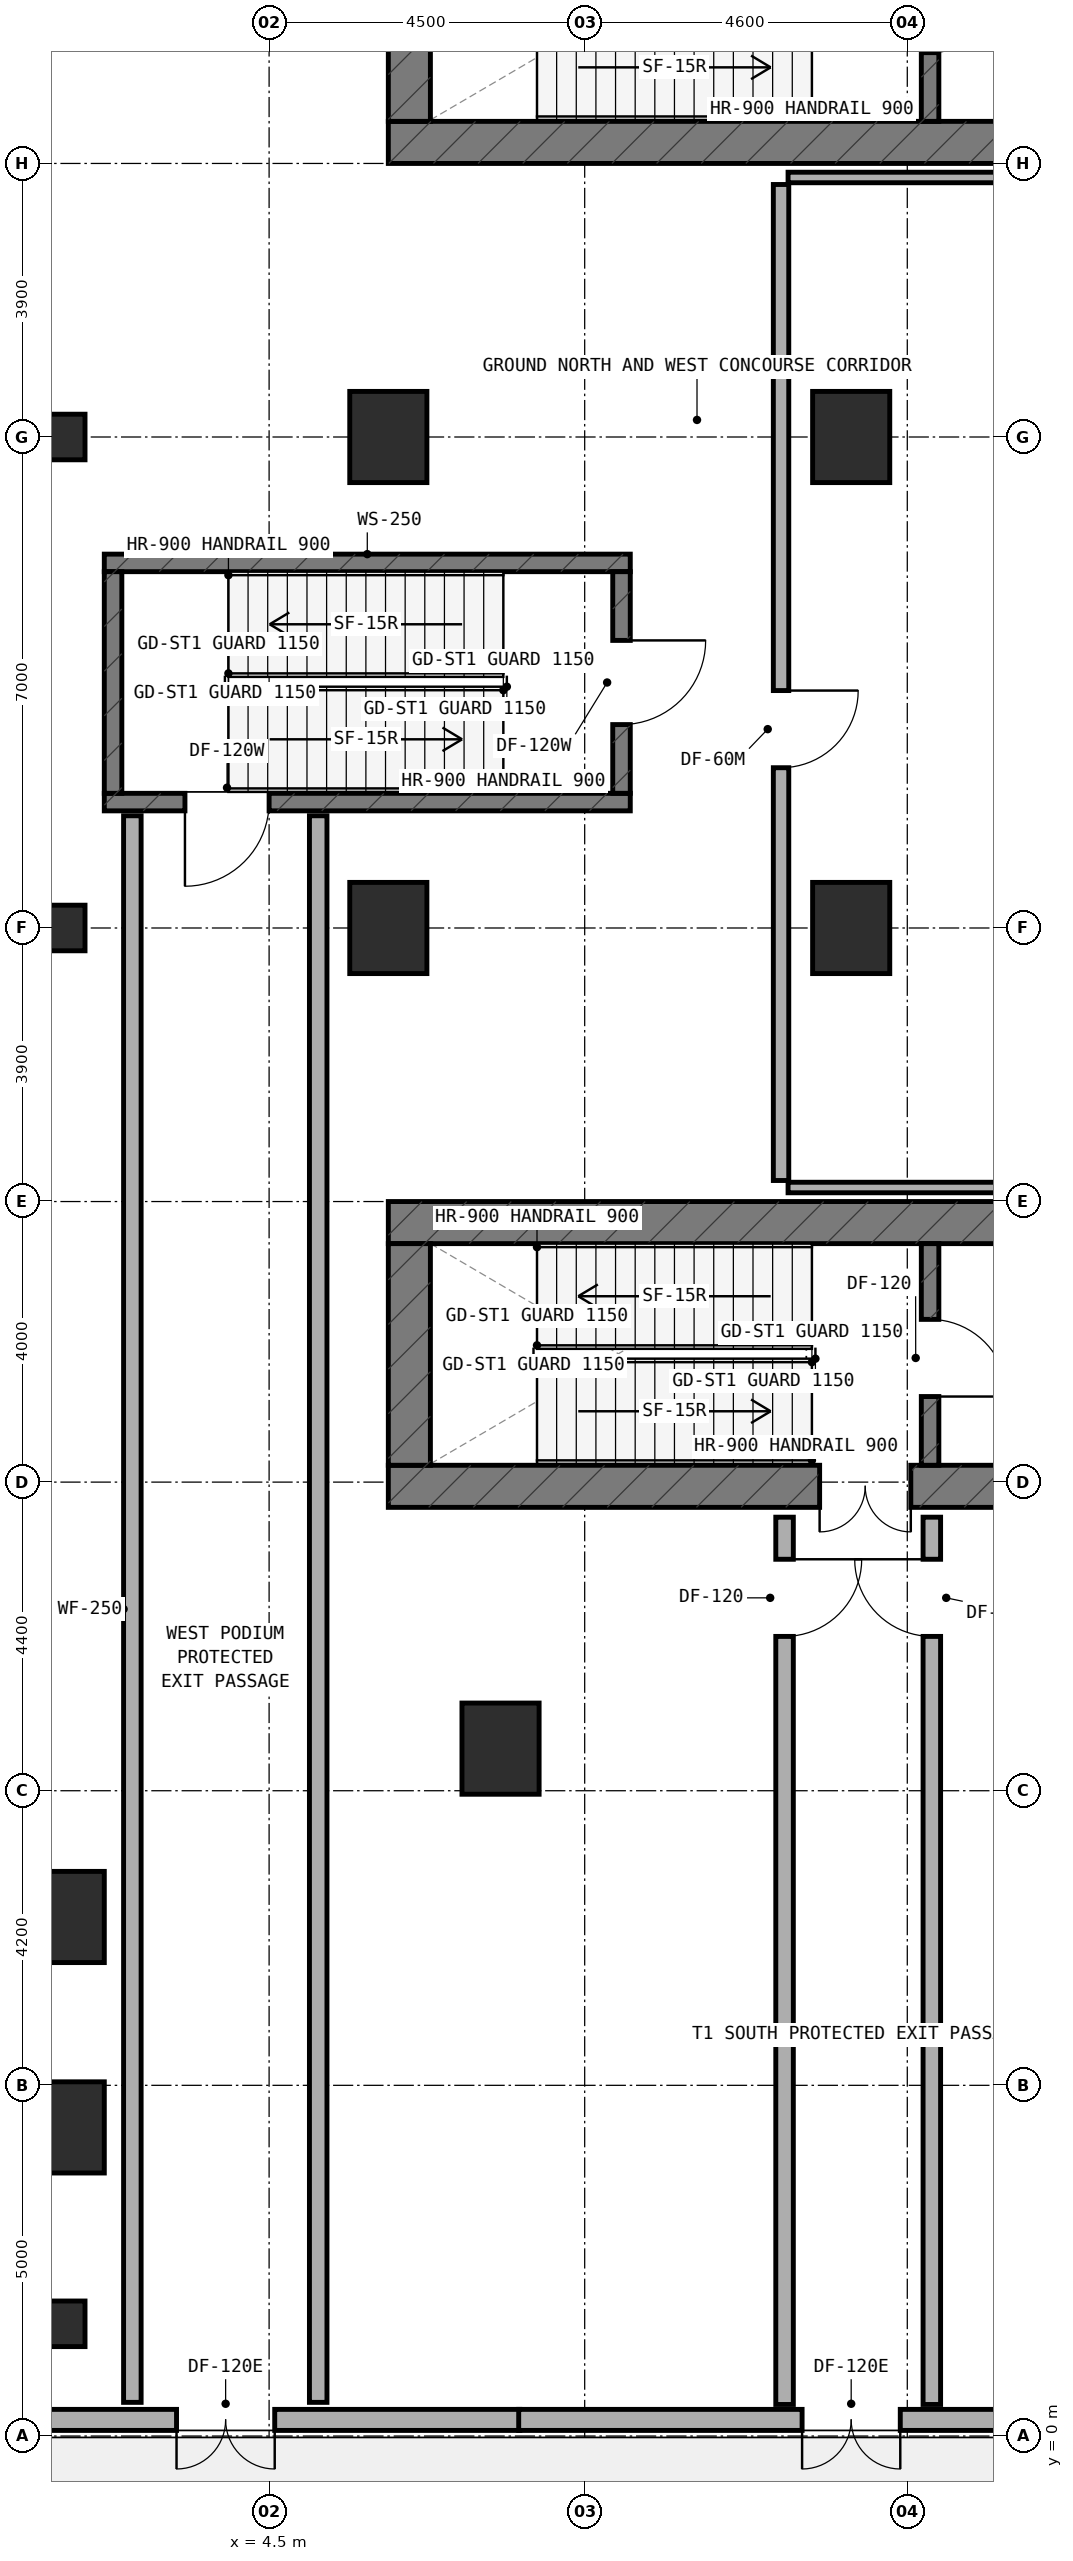
"""IFC4 building model, lengths in metres.
Left out: names, types, materials, properties, quantities, classifications, styles, units other than length and angle.
Written with IfcOpenShell. Run it as: python <this file> out.ifc"""

import sys

from ifc_helpers import new_model, si_unit, direction, frame, frame_2d, origin, origin_2d, place, context, subcontext, project, spatial, rectangle, extrude, element, fill, save


model = new_model("IFC4")
c1 = context("Model", 3, precision=1e-05, world=origin(), true_north=direction((0.0, 1.0)))
c2 = subcontext(c1, "Body", "Model", "MODEL_VIEW")
j1 = project(units=[si_unit("LENGTHUNIT", "METRE"), si_unit("PLANEANGLEUNIT", "RADIAN")], contexts=[c1])
p1 = place(None, origin())
s1 = spatial("IfcSite", under=j1, at=p1, CompositionType="ELEMENT")
p2 = place(p1, origin())
s2 = spatial("IfcBuilding", under=s1, at=p2, CompositionType="ELEMENT")
p3 = place(p2, origin())
s3 = spatial("IfcBuildingStorey", under=s2, at=p3, CompositionType="ELEMENT", Elevation=0.0)
p4 = place(p3, frame((6.2, 32.7, 0.0), z_axis=(0.0, 0.0, 1.0), x_axis=(1.0, 0.0, 0.0)))
e1 = element("IfcWall", 1, at=p4, inside=s3, PredefinedType="SHEAR", context=c2, shape_type="SweptSolid", body=[
    extrude(rectangle(XDim=24.8, YDim=0.6, at=frame_2d((12.4, 0.0))), origin(), (0.0, 0.0, 1.0), 5.4),
])
p5 = place(p3, frame((6.5, 33.0, 0.0), z_axis=(0.0, 0.0, 1.0), x_axis=(0.0, 1.0, 0.0)))
e2 = element("IfcWall", 2, at=p5, inside=s3, PredefinedType="SHEAR", context=c2, shape_type="SweptSolid", body=[
    extrude(rectangle(XDim=3.16, YDim=0.6, at=frame_2d((1.58, 0.0))), origin(), (0.0, 0.0, 1.0), 5.4),
])
p6 = place(p3, frame((13.925, 33.0, 0.0), z_axis=(0.0, 0.0, 1.0), x_axis=(0.0, 1.0, 0.0)))
e3 = element("IfcWall", 3, at=p6, inside=s3, PredefinedType="STANDARD", context=c2, shape_type="SweptSolid", body=[
    extrude(rectangle(XDim=3.16, YDim=0.25, at=frame_2d((1.58, 0.0))), origin(), (0.0, 0.0, 1.0), 5.05),
])
p7 = place(p6, frame((0.98, 0.0, 0.0)))
e4 = element("IfcOpeningElement", 4, at=p7, cuts=e3, PredefinedType="OPENING", context=c2, shape_type="SweptSolid", body=[
    extrude(rectangle(XDim=1.1, YDim=2.15, at=frame_2d((0.55, 1.075))), frame((0.0, 0.135, 0.0), z_axis=(0.0, -1.0, 0.0), x_axis=(1.0, 0.0, 0.0)), (0.0, 0.0, 1.0), 0.27),
])
p8 = place(p3, frame((6.2, 13.54, 0.0), z_axis=(0.0, 0.0, 1.0), x_axis=(1.0, 0.0, 0.0)))
e5 = element("IfcWall", 5, at=p8, inside=s3, PredefinedType="SHEAR", context=c2, shape_type="SweptSolid", body=[
    extrude(rectangle(XDim=24.8, YDim=0.6, at=frame_2d((12.4, 0.0))), origin(), (0.0, 0.0, 1.0), 5.4),
])
p9 = place(p8, frame((9.35, 0.0, 0.0)))
e6 = element("IfcOpeningElement", 6, at=p9, cuts=e5, PredefinedType="OPENING", context=c2, shape_type="SweptSolid", body=[
    extrude(rectangle(XDim=1.2, YDim=2.15, at=frame_2d((0.6, 1.075))), frame((0.0, 0.31, 0.0), z_axis=(0.0, -1.0, 0.0), x_axis=(1.0, 0.0, 0.0)), (0.0, 0.0, 1.0), 0.62),
])
p10 = place(p8, frame((6.15, 0.0, 0.0)))
e7 = element("IfcOpeningElement", 7, at=p10, cuts=e5, PredefinedType="OPENING", context=c2, shape_type="SweptSolid", body=[
    extrude(rectangle(XDim=1.3, YDim=2.15, at=frame_2d((0.65, 1.075))), frame((0.0, 0.31, 0.0), z_axis=(0.0, -1.0, 0.0), x_axis=(1.0, 0.0, 0.0)), (0.0, 0.0, 1.0), 0.62),
])
p11 = place(p8, frame((17.14, 0.0, 0.0)))
e8 = element("IfcOpeningElement", 8, at=p11, cuts=e5, PredefinedType="OPENING", context=c2, shape_type="SweptSolid", body=[
    extrude(rectangle(XDim=0.85, YDim=2.1, at=frame_2d((0.425, 1.05))), frame((0.0, 0.31, 0.0), z_axis=(0.0, -1.0, 0.0), x_axis=(1.0, 0.0, 0.0)), (0.0, 0.0, 1.0), 0.62),
])
p12 = place(p8, frame((18.983, 0.0, 0.0)))
e9 = element("IfcOpeningElement", 9, at=p12, cuts=e5, PredefinedType="OPENING", context=c2, shape_type="SweptSolid", body=[
    extrude(rectangle(XDim=1.1, YDim=2.15, at=frame_2d((0.55, 1.075))), frame((0.0, 0.31, 0.0), z_axis=(0.0, -1.0, 0.0), x_axis=(1.0, 0.0, 0.0)), (0.0, 0.0, 1.0), 0.62),
])
p13 = place(p8, frame((20.85, 0.0, 0.0)))
e10 = element("IfcOpeningElement", 10, at=p13, cuts=e5, PredefinedType="OPENING", context=c2, shape_type="SweptSolid", body=[
    extrude(rectangle(XDim=1.1, YDim=2.15, at=frame_2d((0.55, 1.075))), frame((0.0, 0.31, 0.0), z_axis=(0.0, -1.0, 0.0), x_axis=(1.0, 0.0, 0.0)), (0.0, 0.0, 1.0), 0.62),
])
p14 = place(p8, frame((22.716, 0.0, 0.0)))
e11 = element("IfcOpeningElement", 11, at=p14, cuts=e5, PredefinedType="OPENING", context=c2, shape_type="SweptSolid", body=[
    extrude(rectangle(XDim=1.1, YDim=2.15, at=frame_2d((0.55, 1.075))), frame((0.0, 0.31, 0.0), z_axis=(0.0, -1.0, 0.0), x_axis=(1.0, 0.0, 0.0)), (0.0, 0.0, 1.0), 0.62),
])
p15 = place(p3, frame((6.2, 17.3, 0.0), z_axis=(0.0, 0.0, 1.0), x_axis=(1.0, 0.0, 0.0)))
e12 = element("IfcWall", 12, at=p15, inside=s3, PredefinedType="SHEAR", context=c2, shape_type="SweptSolid", body=[
    extrude(rectangle(XDim=24.8, YDim=0.6, at=frame_2d((12.4, 0.0))), origin(), (0.0, 0.0, 1.0), 5.4),
])
p16 = place(p3, frame((6.5, 13.84, 0.0), z_axis=(0.0, 0.0, 1.0), x_axis=(0.0, 1.0, 0.0)))
e13 = element("IfcWall", 13, at=p16, inside=s3, PredefinedType="SHEAR", context=c2, shape_type="SweptSolid", body=[
    extrude(rectangle(XDim=3.16, YDim=0.6, at=frame_2d((1.58, 0.0))), origin(), (0.0, 0.0, 1.0), 5.4),
])
p17 = place(p3, frame((13.925, 13.84, 0.0), z_axis=(0.0, 0.0, 1.0), x_axis=(0.0, 1.0, 0.0)))
e14 = element("IfcWall", 14, at=p17, inside=s3, PredefinedType="STANDARD", context=c2, shape_type="SweptSolid", body=[
    extrude(rectangle(XDim=3.16, YDim=0.25, at=frame_2d((1.58, 0.0))), origin(), (0.0, 0.0, 1.0), 5.05),
])
p18 = place(p17, frame((0.98, 0.0, 0.0)))
e15 = element("IfcOpeningElement", 15, at=p18, cuts=e14, PredefinedType="OPENING", context=c2, shape_type="SweptSolid", body=[
    extrude(rectangle(XDim=1.1, YDim=2.15, at=frame_2d((0.55, 1.075))), frame((0.0, 0.135, 0.0), z_axis=(0.0, -1.0, 0.0), x_axis=(1.0, 0.0, 0.0)), (0.0, 0.0, 1.0), 0.27),
])
p19 = place(p3, frame((2.15, 23.295, 0.0), z_axis=(0.0, 0.0, 1.0), x_axis=(1.0, 0.0, 0.0)))
e16 = element("IfcWall", 16, at=p19, inside=s3, PredefinedType="STANDARD", context=c2, shape_type="SweptSolid", body=[
    extrude(rectangle(XDim=7.5, YDim=0.25, at=frame_2d((3.75, 0.0))), origin(), (0.0, 0.0, 1.0), 5.4),
])
p20 = place(p19, frame((1.15, 0.0, 0.0)))
e17 = element("IfcOpeningElement", 17, at=p20, cuts=e16, PredefinedType="OPENING", context=c2, shape_type="SweptSolid", body=[
    extrude(rectangle(XDim=1.2, YDim=2.15, at=frame_2d((0.6, 1.075))), frame((0.0, 0.135, 0.0), z_axis=(0.0, -1.0, 0.0), x_axis=(1.0, 0.0, 0.0)), (0.0, 0.0, 1.0), 0.27),
])
p21 = place(p3, frame((2.15, 26.705, 0.0), z_axis=(0.0, 0.0, 1.0), x_axis=(1.0, 0.0, 0.0)))
e18 = element("IfcWall", 18, at=p21, inside=s3, PredefinedType="STANDARD", context=c2, shape_type="SweptSolid", body=[
    extrude(rectangle(XDim=7.5, YDim=0.25, at=frame_2d((3.75, 0.0))), origin(), (0.0, 0.0, 1.0), 5.4),
])
p22 = place(p3, frame((2.275, 23.42, 0.0), z_axis=(0.0, 0.0, 1.0), x_axis=(0.0, 1.0, 0.0)))
e19 = element("IfcWall", 19, at=p22, inside=s3, PredefinedType="STANDARD", context=c2, shape_type="SweptSolid", body=[
    extrude(rectangle(XDim=3.16, YDim=0.25, at=frame_2d((1.58, 0.0))), origin(), (0.0, 0.0, 1.0), 5.4),
])
p23 = place(p3, frame((9.525, 23.42, 0.0), z_axis=(0.0, 0.0, 1.0), x_axis=(0.0, 1.0, 0.0)))
e20 = element("IfcWall", 20, at=p23, inside=s3, PredefinedType="STANDARD", context=c2, shape_type="SweptSolid", body=[
    extrude(rectangle(XDim=3.16, YDim=0.25, at=frame_2d((1.58, 0.0))), origin(), (0.0, 0.0, 1.0), 5.4),
])
p24 = place(p23, frame((0.98, 0.0, 0.0)))
e21 = element("IfcOpeningElement", 21, at=p24, cuts=e20, PredefinedType="OPENING", context=c2, shape_type="SweptSolid", body=[
    extrude(rectangle(XDim=1.2, YDim=2.15, at=frame_2d((0.6, 1.075))), frame((0.0, 0.135, 0.0), z_axis=(0.0, -1.0, 0.0), x_axis=(1.0, 0.0, 0.0)), (0.0, 0.0, 1.0), 0.27),
])
for number, where, z_axis, x_axis in (
    (22, (6.2, 21.5, 0.0), (0.0, 0.0, 1.0), (1.0, 0.0, 0.0)),
    (23, (6.2, 28.5, 0.0), (0.0, 0.0, 1.0), (1.0, 0.0, 0.0)),
    (24, (7.8, 9.8, 0.0), (0.0, 0.0, 1.0), (1.0, 0.0, 0.0)),
    (25, (12.8, 21.5, 0.0), (0.0, 0.0, 1.0), (1.0, 0.0, 0.0)),
    (26, (12.8, 28.5, 0.0), (0.0, 0.0, 1.0), (1.0, 0.0, 0.0)),
):
    element("IfcColumn", number, at=place(p3, frame(where, z_axis=z_axis, x_axis=x_axis)), inside=s3, PredefinedType="COLUMN", context=c2, shape_type="SweptSolid", body=[
        extrude(rectangle(XDim=1.1, YDim=1.3, at=origin_2d()), origin(), (0.0, 0.0, 1.0), 5.4),
    ])
for number, where, z_axis, x_axis in (
    (27, (1.6, 21.5, 0.0), (0.0, 0.0, 1.0), (1.0, 0.0, 0.0)),
    (28, (1.6, 28.5, 0.0), (0.0, 0.0, 1.0), (1.0, 0.0, 0.0)),
    (29, (1.6, 1.6, 0.0), (0.0, 0.0, 1.0), (1.0, 0.0, 0.0)),
):
    element("IfcColumn", number, at=place(p3, frame(where, z_axis=z_axis, x_axis=x_axis)), inside=s3, PredefinedType="PILASTER", context=c2, shape_type="SweptSolid", body=[
        extrude(rectangle(XDim=0.55, YDim=0.65, at=origin_2d()), origin(), (0.0, 0.0, 1.0), 5.4),
    ])
for number, where, z_axis, x_axis in (
    (30, (1.6, 4.4, 0.0), (0.0, 0.0, 1.0), (1.0, 0.0, 0.0)),
    (31, (1.6, 7.4, 0.0), (0.0, 0.0, 1.0), (1.0, 0.0, 0.0)),
):
    element("IfcColumn", number, at=place(p3, frame(where, z_axis=z_axis, x_axis=x_axis)), inside=s3, PredefinedType="COLUMN", context=c2, shape_type="SweptSolid", body=[
        extrude(rectangle(XDim=1.1, YDim=1.3, at=origin_2d()), origin(), (0.0, 0.0, 1.0), 5.4),
    ])
p25 = place(p3, frame((0.055, 0.23, 0.0), z_axis=(0.0, 0.0, 1.0), x_axis=(1.0, 0.0, 0.0)))
e32 = element("IfcWall", 32, at=p25, inside=s3, PredefinedType="STANDARD", context=c2, shape_type="SweptSolid", body=[
    extrude(rectangle(XDim=8.02, YDim=0.3, at=frame_2d((4.01, 0.0))), origin(), (0.0, 0.0, 1.0), 5.05),
])
p26 = place(p25, frame((3.125, 0.0, 0.0)))
e33 = element("IfcOpeningElement", 33, at=p26, cuts=e32, PredefinedType="OPENING", context=c2, shape_type="SweptSolid", body=[
    extrude(rectangle(XDim=1.4, YDim=2.2, at=frame_2d((0.7, 1.1))), frame((0.0, 0.16, 0.0), z_axis=(0.0, -1.0, 0.0), x_axis=(1.0, 0.0, 0.0)), (0.0, 0.0, 1.0), 0.32),
])
p27 = place(p3, frame((8.059, 0.23, 0.0), z_axis=(0.0, 0.0, 1.0), x_axis=(1.0, 0.0, 0.0)))
e34 = element("IfcWall", 34, at=p27, inside=s3, PredefinedType="STANDARD", context=c2, shape_type="SweptSolid", body=[
    extrude(rectangle(XDim=8.002, YDim=0.3, at=frame_2d((4.001, 0.0))), origin(), (0.0, 0.0, 1.0), 5.05),
])
p28 = place(p27, frame((4.041, 0.0, 0.0)))
e35 = element("IfcOpeningElement", 35, at=p28, cuts=e34, PredefinedType="OPENING", context=c2, shape_type="SweptSolid", body=[
    extrude(rectangle(XDim=1.4, YDim=2.2, at=frame_2d((0.7, 1.1))), frame((0.0, 0.16, 0.0), z_axis=(0.0, -1.0, 0.0), x_axis=(1.0, 0.0, 0.0)), (0.0, 0.0, 1.0), 0.32),
])
p29 = place(p3, frame((11.85, 0.45, 0.0), z_axis=(0.0, 0.0, 1.0), x_axis=(0.0, 1.0, 0.0)))
e36 = element("IfcWall", 36, at=p29, inside=s3, PredefinedType="SOLIDWALL", context=c2, shape_type="SweptSolid", body=[
    extrude(rectangle(XDim=12.65, YDim=0.25, at=frame_2d((6.325, 0.0))), origin(), (0.0, 0.0, 1.0), 4.225),
])
p30 = place(p29, frame((10.95, 0.0, 0.0)))
e37 = element("IfcOpeningElement", 37, at=p30, cuts=e36, PredefinedType="OPENING", context=c2, shape_type="SweptSolid", body=[
    extrude(rectangle(XDim=1.1, YDim=2.15, at=frame_2d((0.55, 1.075))), frame((0.0, 0.135, 0.0), z_axis=(0.0, -1.0, 0.0), x_axis=(1.0, 0.0, 0.0)), (0.0, 0.0, 1.0), 0.27),
])
p31 = place(p3, frame((13.95, 0.45, 0.0), z_axis=(0.0, 0.0, 1.0), x_axis=(0.0, 1.0, 0.0)))
e38 = element("IfcWall", 38, at=p31, inside=s3, PredefinedType="SOLIDWALL", context=c2, shape_type="SweptSolid", body=[
    extrude(rectangle(XDim=12.65, YDim=0.25, at=frame_2d((6.325, 0.0))), origin(), (0.0, 0.0, 1.0), 4.225),
])
p32 = place(p31, frame((10.95, 0.0, 0.0)))
e39 = element("IfcOpeningElement", 39, at=p32, cuts=e38, PredefinedType="OPENING", context=c2, shape_type="SweptSolid", body=[
    extrude(rectangle(XDim=1.1, YDim=2.15, at=frame_2d((0.55, 1.075))), frame((0.0, 0.135, 0.0), z_axis=(0.0, -1.0, 0.0), x_axis=(1.0, 0.0, 0.0)), (0.0, 0.0, 1.0), 0.27),
])
for number, where, z_axis, x_axis in (
    (40, (2.55, 0.48, 0.0), (0.0, 0.0, 1.0), (0.0, 1.0, 0.0)),
    (41, (5.2, 0.48, 0.0), (0.0, 0.0, 1.0), (0.0, 1.0, 0.0)),
):
    element("IfcWall", number, at=place(p3, frame(where, z_axis=z_axis, x_axis=x_axis)), inside=s3, PredefinedType="SOLIDWALL", context=c2, shape_type="SweptSolid", body=[
        extrude(rectangle(XDim=22.62, YDim=0.25, at=frame_2d((11.31, 0.0))), origin(), (0.0, 0.0, 1.0), 4.125),
    ])
for number, where, z_axis, x_axis in (
    (42, (11.9, 17.8, 0.0), (0.0, 0.0, 1.0), (1.0, 0.0, 0.0)),
    (43, (11.9, 32.2, 0.0), (0.0, 0.0, 1.0), (1.0, 0.0, 0.0)),
):
    element("IfcWall", number, at=place(p3, frame(where, z_axis=z_axis, x_axis=x_axis)), inside=s3, PredefinedType="PARTITIONING", context=c2, shape_type="SweptSolid", body=[
        extrude(rectangle(XDim=17.0, YDim=0.15, at=frame_2d((8.5, 0.0))), origin(), (0.0, 0.0, 1.0), 5.05),
    ])
p33 = place(p3, frame((11.8, 17.9, 0.0), z_axis=(0.0, 0.0, 1.0), x_axis=(0.0, 1.0, 0.0)))
e44 = element("IfcWall", 44, at=p33, inside=s3, PredefinedType="SOLIDWALL", context=c2, shape_type="SweptSolid", body=[
    extrude(rectangle(XDim=14.2, YDim=0.22, at=frame_2d((7.1, 0.0))), origin(), (0.0, 0.0, 1.0), 4.125),
])
p34 = place(p33, frame((5.885, 0.0, 0.0)))
e45 = element("IfcOpeningElement", 45, at=p34, cuts=e44, PredefinedType="OPENING", context=c2, shape_type="SweptSolid", body=[
    extrude(rectangle(XDim=1.1, YDim=2.1, at=frame_2d((0.55, 1.05))), frame((0.0, 0.12, 0.0), z_axis=(0.0, -1.0, 0.0), x_axis=(1.0, 0.0, 0.0)), (0.0, 0.0, 1.0), 0.24),
])
p35 = place(p26, frame((1.4, 0.0, 0.0), z_axis=(0.0, 0.0, 1.0), x_axis=(-1.0, 0.0, 0.0)))
e46 = element("IfcDoor", 46, at=p35, inside=s3, OperationType="DOUBLE_DOOR_SINGLE_SWING", PredefinedType="DOOR", context=c2, shape_type="SweptSolid", body=[
    extrude(rectangle(XDim=1.4, YDim=2.2, at=frame_2d((0.7, 1.1))), frame((0.0, 0.025, 0.0), z_axis=(0.0, -1.0, 0.0), x_axis=(1.0, 0.0, 0.0)), (0.0, 0.0, 1.0), 0.05),
])
fill(e33, e46)
p36 = place(p28, frame((1.4, 0.0, 0.0), z_axis=(0.0, 0.0, 1.0), x_axis=(-1.0, 0.0, 0.0)))
e47 = element("IfcDoor", 47, at=p36, inside=s3, OperationType="DOUBLE_DOOR_SINGLE_SWING", PredefinedType="DOOR", context=c2, shape_type="SweptSolid", body=[
    extrude(rectangle(XDim=1.4, YDim=2.2, at=frame_2d((0.7, 1.1))), frame((0.0, 0.025, 0.0), z_axis=(0.0, -1.0, 0.0), x_axis=(1.0, 0.0, 0.0)), (0.0, 0.0, 1.0), 0.05),
])
fill(e35, e47)
p37 = place(p7, frame((1.1, 0.0, 0.0), z_axis=(0.0, 0.0, 1.0), x_axis=(-1.0, 0.0, 0.0)))
e48 = element("IfcDoor", 48, at=p37, inside=s3, OperationType="SINGLE_SWING_LEFT", PredefinedType="DOOR", context=c2, shape_type="SweptSolid", body=[
    extrude(rectangle(XDim=1.1, YDim=2.15, at=frame_2d((0.55, 1.075))), frame((0.0, 0.025, 0.0), z_axis=(0.0, -1.0, 0.0), x_axis=(1.0, 0.0, 0.0)), (0.0, 0.0, 1.0), 0.05),
])
fill(e4, e48)
p38 = place(p18, frame((1.1, 0.0, 0.0), z_axis=(0.0, 0.0, 1.0), x_axis=(-1.0, 0.0, 0.0)))
e49 = element("IfcDoor", 49, at=p38, inside=s3, OperationType="SINGLE_SWING_RIGHT", PredefinedType="DOOR", context=c2, shape_type="SweptSolid", body=[
    extrude(rectangle(XDim=1.1, YDim=2.15, at=frame_2d((0.55, 1.075))), frame((0.0, 0.025, 0.0), z_axis=(0.0, -1.0, 0.0), x_axis=(1.0, 0.0, 0.0)), (0.0, 0.0, 1.0), 0.05),
])
fill(e15, e49)
p39 = place(p10, frame((1.3, 0.0, 0.0), z_axis=(0.0, 0.0, 1.0), x_axis=(-1.0, 0.0, 0.0)))
e50 = element("IfcDoor", 50, at=p39, inside=s3, OperationType="DOUBLE_DOOR_SINGLE_SWING", PredefinedType="DOOR", context=c2, shape_type="SweptSolid", body=[
    extrude(rectangle(XDim=1.3, YDim=2.15, at=frame_2d((0.65, 1.075))), frame((0.0, 0.025, 0.0), z_axis=(0.0, -1.0, 0.0), x_axis=(1.0, 0.0, 0.0)), (0.0, 0.0, 1.0), 0.05),
])
fill(e7, e50)
p40 = place(p24, frame((1.2, 0.0, 0.0), z_axis=(0.0, 0.0, 1.0), x_axis=(-1.0, 0.0, 0.0)))
e51 = element("IfcDoor", 51, at=p40, inside=s3, OperationType="SINGLE_SWING_LEFT", PredefinedType="DOOR", context=c2, shape_type="SweptSolid", body=[
    extrude(rectangle(XDim=1.2, YDim=2.15, at=frame_2d((0.6, 1.075))), frame((0.0, 0.025, 0.0), z_axis=(0.0, -1.0, 0.0), x_axis=(1.0, 0.0, 0.0)), (0.0, 0.0, 1.0), 0.05),
])
fill(e21, e51)
p41 = place(p20, frame((1.2, 0.0, 0.0), z_axis=(0.0, 0.0, 1.0), x_axis=(-1.0, 0.0, 0.0)))
e52 = element("IfcDoor", 52, at=p41, inside=s3, OperationType="SINGLE_SWING_RIGHT", PredefinedType="DOOR", context=c2, shape_type="SweptSolid", body=[
    extrude(rectangle(XDim=1.2, YDim=2.15, at=frame_2d((0.6, 1.075))), frame((0.0, 0.025, 0.0), z_axis=(0.0, -1.0, 0.0), x_axis=(1.0, 0.0, 0.0)), (0.0, 0.0, 1.0), 0.05),
])
fill(e17, e52)
p42 = place(p30, frame((1.1, 0.0, 0.0), z_axis=(0.0, 0.0, 1.0), x_axis=(-1.0, 0.0, 0.0)))
e53 = element("IfcDoor", 53, at=p42, inside=s3, OperationType="SINGLE_SWING_LEFT", PredefinedType="DOOR", context=c2, shape_type="SweptSolid", body=[
    extrude(rectangle(XDim=1.1, YDim=2.15, at=frame_2d((0.55, 1.075))), frame((0.0, 0.025, 0.0), z_axis=(0.0, -1.0, 0.0), x_axis=(1.0, 0.0, 0.0)), (0.0, 0.0, 1.0), 0.05),
])
fill(e37, e53)
p43 = place(p32, origin())
e54 = element("IfcDoor", 54, at=p43, inside=s3, OperationType="SINGLE_SWING_RIGHT", PredefinedType="DOOR", context=c2, shape_type="SweptSolid", body=[
    extrude(rectangle(XDim=1.1, YDim=2.15, at=frame_2d((0.55, 1.075))), frame((0.0, 0.025, 0.0), z_axis=(0.0, -1.0, 0.0), x_axis=(1.0, 0.0, 0.0)), (0.0, 0.0, 1.0), 0.05),
])
fill(e39, e54)
p44 = place(p34, frame((1.1, 0.0, 0.0), z_axis=(0.0, 0.0, 1.0), x_axis=(-1.0, 0.0, 0.0)))
e55 = element("IfcDoor", 55, at=p44, inside=s3, OperationType="SINGLE_SWING_LEFT", PredefinedType="DOOR", context=c2, shape_type="SweptSolid", body=[
    extrude(rectangle(XDim=1.1, YDim=2.1, at=frame_2d((0.55, 1.05))), frame((0.0, 0.025, 0.0), z_axis=(0.0, -1.0, 0.0), x_axis=(1.0, 0.0, 0.0)), (0.0, 0.0, 1.0), 0.05),
])
fill(e45, e55)
save(model, sys.argv[1])
